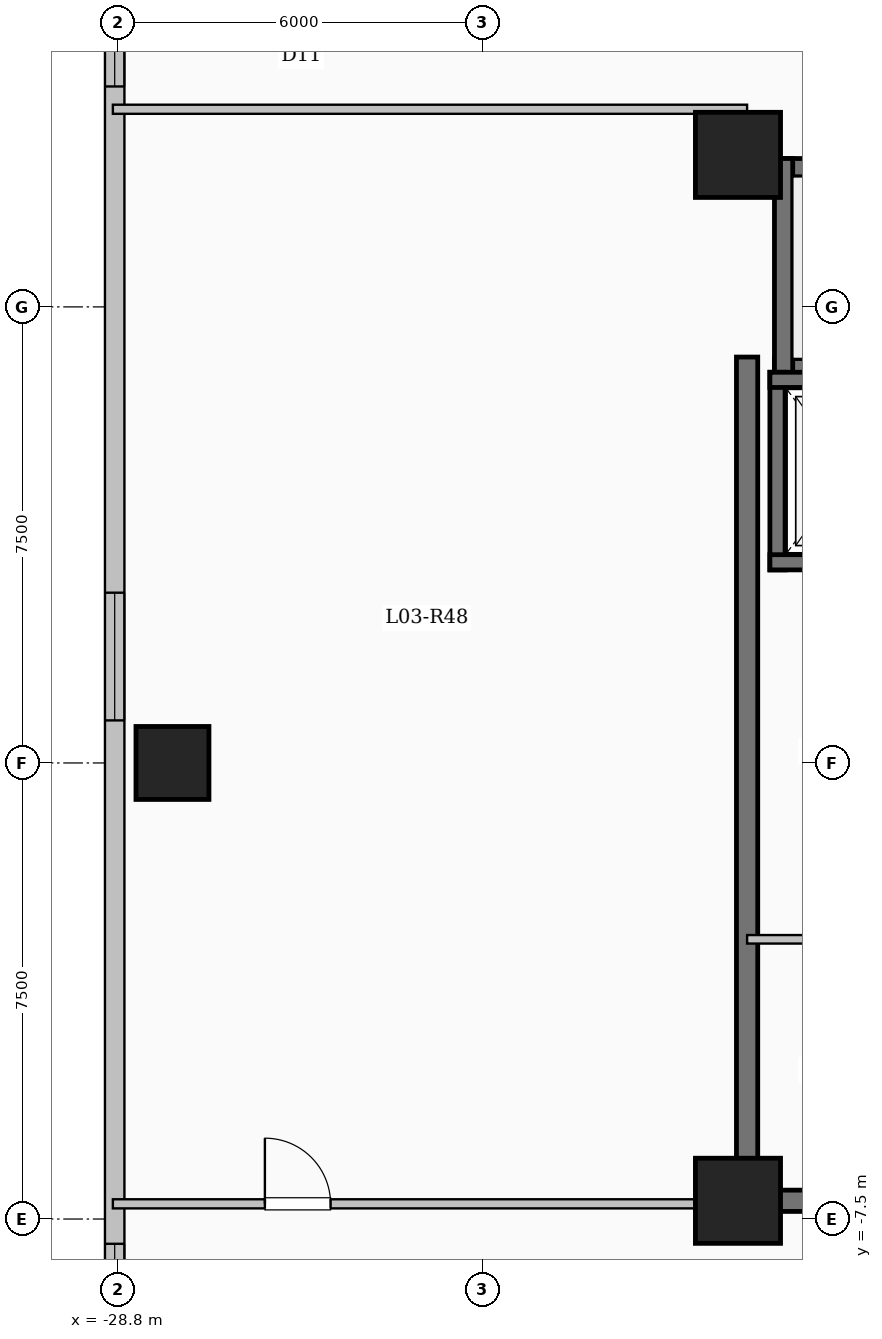
"""IFC4 building model, lengths in metres.
Left out: names, types, materials, properties, quantities, classifications, styles, units other than length and angle.
Written with IfcOpenShell. Run it as: python <this file> out.ifc"""

import sys

from ifc_helpers import new_model, si_unit, direction, frame, frame_2d, origin, origin_2d, place, context, subcontext, project, spatial, rectangle, extrude, element, fill, save


model = new_model("IFC4")
c1 = context("Model", 3, precision=1e-05, world=origin(), true_north=direction((0.0, 1.0)))
c2 = subcontext(c1, "Body", "Model", "MODEL_VIEW")
j1 = project(units=[si_unit("LENGTHUNIT", "METRE"), si_unit("PLANEANGLEUNIT", "RADIAN")], contexts=[c1])
p1 = place(None, origin())
s1 = spatial("IfcSite", under=j1, at=p1, CompositionType="ELEMENT")
p2 = place(p1, origin())
s2 = spatial("IfcBuilding", under=s1, at=p2, CompositionType="ELEMENT")
p3 = place(p2, frame((0.0, 0.0, 14.4)))
s3 = spatial("IfcBuildingStorey", under=s2, at=p3, CompositionType="ELEMENT", Elevation=14.4)
for number, where, z_axis, x_axis in (
    (1, (-18.6, -7.2, 0.0), (0.0, 0.0, 1.0), (1.0, 0.0, 0.0)),
    (2, (-18.6, 10.0, 0.0), (0.0, 0.0, 1.0), (1.0, 0.0, 0.0)),
):
    element("IfcColumn", number, at=place(p3, frame(where, z_axis=z_axis, x_axis=x_axis)), inside=s3, PredefinedType="COLUMN", context=c2, shape_type="SweptSolid", body=[
        extrude(rectangle(XDim=1.4, YDim=1.4, at=origin_2d()), origin(), (0.0, 0.0, 1.0), 4.5),
    ])
p4 = place(p3, frame((-27.9, 0.0, 0.0), z_axis=(0.0, 0.0, 1.0), x_axis=(1.0, 0.0, 0.0)))
e3 = element("IfcColumn", 3, at=p4, inside=s3, PredefinedType="COLUMN", context=c2, shape_type="SweptSolid", body=[
    extrude(rectangle(XDim=1.2, YDim=1.2, at=origin_2d()), origin(), (0.0, 0.0, 1.0), 4.5),
])
p5 = place(p3, frame((-28.85, -26.25, 0.0), z_axis=(0.0, 0.0, 1.0), x_axis=(0.0, 1.0, 0.0)))
e4 = element("IfcWall", 4, at=p5, inside=s3, PredefinedType="SOLIDWALL", context=c2, shape_type="SweptSolid", body=[
    extrude(rectangle(XDim=56.1, YDim=0.32, at=frame_2d((28.05, 0.0))), origin(), (0.0, 0.0, 1.0), 4.2),
])
p6 = place(p5, frame((6.85, 0.0, 0.9)))
e5 = element("IfcOpeningElement", 5, at=p6, cuts=e4, PredefinedType="OPENING", context=c2, shape_type="SweptSolid", body=[
    extrude(rectangle(XDim=2.1, YDim=2.0, at=frame_2d((1.05, 1.0))), frame((0.0, 0.17, 0.0), z_axis=(0.0, -1.0, 0.0), x_axis=(1.0, 0.0, 0.0)), (0.0, 0.0, 1.0), 0.34),
])
p7 = place(p5, frame((16.643, 0.0, 0.9)))
e6 = element("IfcOpeningElement", 6, at=p7, cuts=e4, PredefinedType="OPENING", context=c2, shape_type="SweptSolid", body=[
    extrude(rectangle(XDim=1.7, YDim=1.9, at=frame_2d((0.85, 0.95))), frame((0.0, 0.17, 0.0), z_axis=(0.0, -1.0, 0.0), x_axis=(1.0, 0.0, 0.0)), (0.0, 0.0, 1.0), 0.34),
])
p8 = place(p5, frame((26.95, 0.0, 0.9)))
e7 = element("IfcOpeningElement", 7, at=p8, cuts=e4, PredefinedType="OPENING", context=c2, shape_type="SweptSolid", body=[
    extrude(rectangle(XDim=2.1, YDim=2.0, at=frame_2d((1.05, 1.0))), frame((0.0, 0.17, 0.0), z_axis=(0.0, -1.0, 0.0), x_axis=(1.0, 0.0, 0.0)), (0.0, 0.0, 1.0), 0.34),
])
p9 = place(p5, frame((37.375, 0.0, 0.95)))
e8 = element("IfcOpeningElement", 8, at=p9, cuts=e4, PredefinedType="OPENING", context=c2, shape_type="SweptSolid", body=[
    extrude(rectangle(XDim=1.0, YDim=1.5, at=frame_2d((0.5, 0.75))), frame((0.0, 0.17, 0.0), z_axis=(0.0, -1.0, 0.0), x_axis=(1.0, 0.0, 0.0)), (0.0, 0.0, 1.0), 0.34),
])
p10 = place(p5, frame((46.4, 0.0, 0.9)))
e9 = element("IfcOpeningElement", 9, at=p10, cuts=e4, PredefinedType="OPENING", context=c2, shape_type="SweptSolid", body=[
    extrude(rectangle(XDim=2.1, YDim=2.0, at=frame_2d((1.05, 1.0))), frame((0.0, 0.17, 0.0), z_axis=(0.0, -1.0, 0.0), x_axis=(1.0, 0.0, 0.0)), (0.0, 0.0, 1.0), 0.34),
])
p11 = place(p3, frame((-18.0, 9.79, 0.0), z_axis=(0.0, 0.0, 1.0), x_axis=(1.0, 0.0, 0.0)))
e10 = element("IfcWall", 10, at=p11, inside=s3, PredefinedType="SHEAR", context=c2, shape_type="SweptSolid", body=[
    extrude(rectangle(XDim=8.0, YDim=0.3, at=frame_2d((4.0, 0.0))), origin(), (0.0, 0.0, 1.0), 4.5),
])
p12 = place(p3, frame((-18.0, 6.5, 0.0), z_axis=(0.0, 0.0, 1.0), x_axis=(1.0, 0.0, 0.0)))
e11 = element("IfcWall", 11, at=p12, inside=s3, PredefinedType="SHEAR", context=c2, shape_type="SweptSolid", body=[
    extrude(rectangle(XDim=8.0, YDim=0.3, at=frame_2d((4.0, 0.0))), origin(), (0.0, 0.0, 1.0), 4.5),
])
p13 = place(p12, frame((6.45, 0.0, 0.0)))
e12 = element("IfcOpeningElement", 12, at=p13, cuts=e11, PredefinedType="OPENING", context=c2, shape_type="SweptSolid", body=[
    extrude(rectangle(XDim=1.0, YDim=2.15, at=frame_2d((0.5, 1.075))), frame((0.0, 0.16, 0.0), z_axis=(0.0, -1.0, 0.0), x_axis=(1.0, 0.0, 0.0)), (0.0, 0.0, 1.0), 0.32),
])
p14 = place(p3, frame((-17.85, 6.35, 0.0), z_axis=(0.0, 0.0, 1.0), x_axis=(0.0, 1.0, 0.0)))
e13 = element("IfcWall", 13, at=p14, inside=s3, PredefinedType="SHEAR", context=c2, shape_type="SweptSolid", body=[
    extrude(rectangle(XDim=3.59, YDim=0.3, at=frame_2d((1.795, 0.0))), origin(), (0.0, 0.0, 1.0), 4.5),
])
p15 = place(p3, frame((-17.95, 3.175, 0.0), z_axis=(0.0, 0.0, 1.0), x_axis=(0.0, 1.0, 0.0)))
e14 = element("IfcWall", 14, at=p15, inside=s3, PredefinedType="SHEAR", context=c2, shape_type="SweptSolid", body=[
    extrude(rectangle(XDim=3.25, YDim=0.25, at=frame_2d((1.625, 0.0))), origin(), (0.0, 0.0, 1.0), 4.5),
])
for number, where, z_axis, x_axis in (
    (15, (-18.075, 3.3, 0.0), (0.0, 0.0, 1.0), (1.0, 0.0, 0.0)),
    (16, (-18.075, 6.3, 0.0), (0.0, 0.0, 1.0), (1.0, 0.0, 0.0)),
):
    element("IfcWall", number, at=place(p3, frame(where, z_axis=z_axis, x_axis=x_axis)), inside=s3, PredefinedType="SHEAR", context=c2, shape_type="SweptSolid", body=[
        extrude(rectangle(XDim=2.55, YDim=0.25, at=frame_2d((1.275, 0.0))), origin(), (0.0, 0.0, 1.0), 4.5),
    ])
p16 = place(p3, frame((-18.45, -7.375, 0.0), z_axis=(0.0, 0.0, 1.0), x_axis=(0.0, 1.0, 0.0)))
e17 = element("IfcWall", 17, at=p16, inside=s3, PredefinedType="SHEAR", context=c2, shape_type="SweptSolid", body=[
    extrude(rectangle(XDim=14.05, YDim=0.35, at=frame_2d((7.025, 0.0))), origin(), (0.0, 0.0, 1.0), 4.5),
])
p17 = place(p3, frame((-18.625, -7.2, 0.0), z_axis=(0.0, 0.0, 1.0), x_axis=(1.0, 0.0, 0.0)))
e18 = element("IfcWall", 18, at=p17, inside=s3, PredefinedType="SHEAR", context=c2, shape_type="SweptSolid", body=[
    extrude(rectangle(XDim=8.55, YDim=0.35, at=frame_2d((4.275, 0.0))), origin(), (0.0, 0.0, 1.0), 4.5),
])
p18 = place(p3, frame((-18.45, -2.9, 0.0), z_axis=(0.0, 0.0, 1.0), x_axis=(1.0, 0.0, 0.0)))
e19 = element("IfcWall", 19, at=p18, inside=s3, PredefinedType="PARTITIONING", context=c2, shape_type="SweptSolid", body=[
    extrude(rectangle(XDim=3.05, YDim=0.14, at=frame_2d((1.525, 0.0))), origin(), (0.0, 0.0, 1.0), 4.2),
])
p19 = place(p18, frame((1.05, 0.0, 0.0)))
e20 = element("IfcOpeningElement", 20, at=p19, cuts=e19, PredefinedType="OPENING", context=c2, shape_type="SweptSolid", body=[
    extrude(rectangle(XDim=0.9, YDim=2.08, at=frame_2d((0.45, 1.04))), frame((0.0, 0.08, 0.0), z_axis=(0.0, -1.0, 0.0), x_axis=(1.0, 0.0, 0.0)), (0.0, 0.0, 1.0), 0.16),
])
p20 = place(p3, frame((-28.88, -7.25, 0.0), z_axis=(0.0, 0.0, 1.0), x_axis=(1.0, 0.0, 0.0)))
e21 = element("IfcWall", 21, at=p20, inside=s3, PredefinedType="PARTITIONING", context=c2, shape_type="SweptSolid", body=[
    extrude(rectangle(XDim=10.43, YDim=0.15, at=frame_2d((5.215, 0.0))), origin(), (0.0, 0.0, 1.0), 4.2),
])
p21 = place(p20, frame((2.5, 0.0, 0.0)))
e22 = element("IfcOpeningElement", 22, at=p21, cuts=e21, PredefinedType="OPENING", context=c2, shape_type="SweptSolid", body=[
    extrude(rectangle(XDim=1.08, YDim=2.15, at=frame_2d((0.54, 1.075))), frame((0.0, 0.085, 0.0), z_axis=(0.0, -1.0, 0.0), x_axis=(1.0, 0.0, 0.0)), (0.0, 0.0, 1.0), 0.17),
])
p22 = place(p3, frame((-28.88, 10.75, 0.0), z_axis=(0.0, 0.0, 1.0), x_axis=(1.0, 0.0, 0.0)))
e23 = element("IfcWall", 23, at=p22, inside=s3, PredefinedType="PARTITIONING", context=c2, shape_type="SweptSolid", body=[
    extrude(rectangle(XDim=10.43, YDim=0.15, at=frame_2d((5.215, 0.0))), origin(), (0.0, 0.0, 1.0), 4.2),
])
p23 = place(p7, origin())
e24 = element("IfcWindow", 24, at=p23, inside=s3, PartitioningType="SINGLE_PANEL", PredefinedType="WINDOW", context=c2, shape_type="SweptSolid", body=[
    extrude(rectangle(XDim=1.7, YDim=1.9, at=frame_2d((0.85, 0.95))), frame((0.0, 0.03, 0.0), z_axis=(0.0, -1.0, 0.0), x_axis=(1.0, 0.0, 0.0)), (0.0, 0.0, 1.0), 0.06),
])
fill(e6, e24)
p24 = place(p8, origin())
e25 = element("IfcWindow", 25, at=p24, inside=s3, PartitioningType="SINGLE_PANEL", PredefinedType="WINDOW", context=c2, shape_type="SweptSolid", body=[
    extrude(rectangle(XDim=2.1, YDim=2.0, at=frame_2d((1.05, 1.0))), frame((0.0, 0.03, 0.0), z_axis=(0.0, -1.0, 0.0), x_axis=(1.0, 0.0, 0.0)), (0.0, 0.0, 1.0), 0.06),
])
fill(e7, e25)
p25 = place(p9, origin())
e26 = element("IfcWindow", 26, at=p25, inside=s3, PartitioningType="SINGLE_PANEL", PredefinedType="WINDOW", context=c2, shape_type="SweptSolid", body=[
    extrude(rectangle(XDim=1.0, YDim=1.5, at=frame_2d((0.5, 0.75))), frame((0.0, 0.03, 0.0), z_axis=(0.0, -1.0, 0.0), x_axis=(1.0, 0.0, 0.0)), (0.0, 0.0, 1.0), 0.06),
])
fill(e8, e26)
p26 = place(p21, origin())
e27 = element("IfcDoor", 27, at=p26, inside=s3, OperationType="SINGLE_SWING_LEFT", PredefinedType="DOOR", context=c2, shape_type="SweptSolid", body=[
    extrude(rectangle(XDim=1.08, YDim=2.15, at=frame_2d((0.54, 1.075))), frame((0.0, 0.025, 0.0), z_axis=(0.0, -1.0, 0.0), x_axis=(1.0, 0.0, 0.0)), (0.0, 0.0, 1.0), 0.05),
])
fill(e22, e27)
save(model, sys.argv[1])
